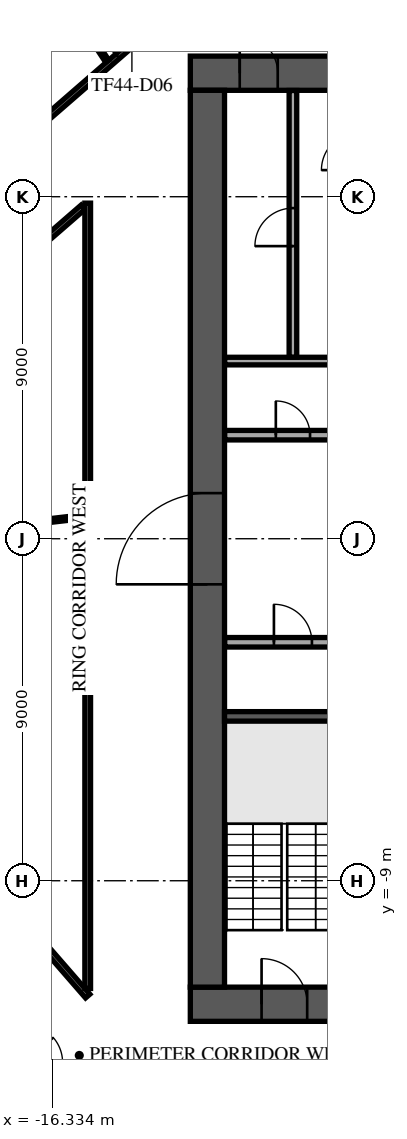
"""IFC4 building model, lengths in metres.
Left out: names, types, materials, properties, quantities, classifications, styles, units other than length and angle.
Written with IfcOpenShell. Run it as: python <this file> out.ifc"""

import sys

from ifc_helpers import new_model, si_unit, direction, frame, frame_2d, origin, place, context, subcontext, project, spatial, rectangle, extrude, element, fill, save


model = new_model("IFC4")
c1 = context("Model", 3, precision=1e-05, world=origin(), true_north=direction((0.0, 1.0)))
c2 = subcontext(c1, "Body", "Model", "MODEL_VIEW")
j1 = project(units=[si_unit("LENGTHUNIT", "METRE"), si_unit("PLANEANGLEUNIT", "RADIAN")], contexts=[c1])
p1 = place(None, origin())
s1 = spatial("IfcSite", under=j1, at=p1, CompositionType="ELEMENT")
p2 = place(p1, origin())
s2 = spatial("IfcBuilding", under=s1, at=p2, CompositionType="ELEMENT")
p3 = place(p2, frame((0.0, 0.0, 193.3)))
s3 = spatial("IfcBuildingStorey", under=s2, at=p3, CompositionType="ELEMENT", Elevation=193.3)
p4 = place(p3, frame((-12.7, 12.25, 0.0), z_axis=(0.0, 0.0, 1.0), x_axis=(1.0, 0.0, 0.0)))
e1 = element("IfcWall", 1, at=p4, inside=s3, PredefinedType="SHEAR", context=c2, shape_type="SweptSolid", body=[
    extrude(rectangle(XDim=25.4, YDim=0.9, at=frame_2d((12.7, 0.0))), origin(), (0.0, 0.0, 1.0), 3.62),
])
p5 = place(p4, frame((11.5, 0.0, 0.0)))
e2 = element("IfcOpeningElement", 2, at=p5, cuts=e1, PredefinedType="OPENING", context=c2, shape_type="SweptSolid", body=[
    extrude(rectangle(XDim=2.4, YDim=2.4, at=frame_2d((1.2, 1.2))), frame((0.0, 0.46, 0.0), z_axis=(0.0, -1.0, 0.0), x_axis=(1.0, 0.0, 0.0)), (0.0, 0.0, 1.0), 0.92),
])
p6 = place(p4, frame((22.325, 0.0, 0.0)))
e3 = element("IfcOpeningElement", 3, at=p6, cuts=e1, PredefinedType="OPENING", context=c2, shape_type="SweptSolid", body=[
    extrude(rectangle(XDim=1.2, YDim=2.1, at=frame_2d((0.6, 1.05))), frame((0.0, 0.46, 0.0), z_axis=(0.0, -1.0, 0.0), x_axis=(1.0, 0.0, 0.0)), (0.0, 0.0, 1.0), 0.92),
])
p7 = place(p4, frame((1.3, 0.0, 0.0)))
e4 = element("IfcOpeningElement", 4, at=p7, cuts=e1, PredefinedType="OPENING", context=c2, shape_type="SweptSolid", body=[
    extrude(rectangle(XDim=1.0, YDim=2.1, at=frame_2d((0.5, 1.05))), frame((0.0, 0.46, 0.0), z_axis=(0.0, -1.0, 0.0), x_axis=(1.0, 0.0, 0.0)), (0.0, 0.0, 1.0), 0.92),
])
p8 = place(p3, frame((-12.7, -12.25, 0.0), z_axis=(0.0, 0.0, 1.0), x_axis=(1.0, 0.0, 0.0)))
e5 = element("IfcWall", 5, at=p8, inside=s3, PredefinedType="SHEAR", context=c2, shape_type="SweptSolid", body=[
    extrude(rectangle(XDim=25.4, YDim=0.9, at=frame_2d((12.7, 0.0))), origin(), (0.0, 0.0, 1.0), 3.62),
])
p9 = place(p8, frame((7.6, 0.0, 0.0)))
e6 = element("IfcOpeningElement", 6, at=p9, cuts=e5, PredefinedType="OPENING", context=c2, shape_type="SweptSolid", body=[
    extrude(rectangle(XDim=2.0, YDim=2.1, at=frame_2d((1.0, 1.05))), frame((0.0, 0.46, 0.0), z_axis=(0.0, -1.0, 0.0), x_axis=(1.0, 0.0, 0.0)), (0.0, 0.0, 1.0), 0.92),
])
p10 = place(p8, frame((17.725, 0.0, 0.0)))
e7 = element("IfcOpeningElement", 7, at=p10, cuts=e5, PredefinedType="OPENING", context=c2, shape_type="SweptSolid", body=[
    extrude(rectangle(XDim=1.2, YDim=2.1, at=frame_2d((0.6, 1.05))), frame((0.0, 0.46, 0.0), z_axis=(0.0, -1.0, 0.0), x_axis=(1.0, 0.0, 0.0)), (0.0, 0.0, 1.0), 0.92),
])
p11 = place(p8, frame((1.875, 0.0, 0.0)))
e8 = element("IfcOpeningElement", 8, at=p11, cuts=e5, PredefinedType="OPENING", context=c2, shape_type="SweptSolid", body=[
    extrude(rectangle(XDim=1.2, YDim=2.1, at=frame_2d((0.6, 1.05))), frame((0.0, 0.46, 0.0), z_axis=(0.0, -1.0, 0.0), x_axis=(1.0, 0.0, 0.0)), (0.0, 0.0, 1.0), 0.92),
])
p12 = place(p8, frame((22.325, 0.0, 0.0)))
e9 = element("IfcOpeningElement", 9, at=p12, cuts=e5, PredefinedType="OPENING", context=c2, shape_type="SweptSolid", body=[
    extrude(rectangle(XDim=1.2, YDim=2.1, at=frame_2d((0.6, 1.05))), frame((0.0, 0.46, 0.0), z_axis=(0.0, -1.0, 0.0), x_axis=(1.0, 0.0, 0.0)), (0.0, 0.0, 1.0), 0.92),
])
p13 = place(p3, frame((-12.25, -11.8, 0.0), z_axis=(0.0, 0.0, 1.0), x_axis=(0.0, 1.0, 0.0)))
e10 = element("IfcWall", 10, at=p13, inside=s3, PredefinedType="SHEAR", context=c2, shape_type="SweptSolid", body=[
    extrude(rectangle(XDim=23.6, YDim=0.9, at=frame_2d((11.8, 0.0))), origin(), (0.0, 0.0, 1.0), 3.62),
])
p14 = place(p13, frame((10.6, 0.0, 0.0)))
e11 = element("IfcOpeningElement", 11, at=p14, cuts=e10, PredefinedType="OPENING", context=c2, shape_type="SweptSolid", body=[
    extrude(rectangle(XDim=2.4, YDim=2.4, at=frame_2d((1.2, 1.2))), frame((0.0, 0.46, 0.0), z_axis=(0.0, -1.0, 0.0), x_axis=(1.0, 0.0, 0.0)), (0.0, 0.0, 1.0), 0.92),
])
p15 = place(p3, frame((-8.65, -4.675, 0.0), z_axis=(0.0, 0.0, 1.0), x_axis=(-1.0, 0.0, 0.0)))
e12 = element("IfcWall", 12, at=p15, inside=s3, PredefinedType="SOLIDWALL", context=c2, shape_type="SweptSolid", body=[
    extrude(rectangle(XDim=3.15, YDim=0.25, at=frame_2d((1.575, 0.0))), origin(), (0.0, 0.0, 1.0), 3.62),
])
p16 = place(p3, frame((-11.795, -2.725, 0.0), z_axis=(0.0, 0.0, 1.0), x_axis=(1.0, 0.0, 0.0)))
e13 = element("IfcWall", 13, at=p16, inside=s3, PredefinedType="PARTITIONING", context=c2, shape_type="SweptSolid", body=[
    extrude(rectangle(XDim=8.915, YDim=0.25, at=frame_2d((4.458, 0.0))), origin(), (0.0, 0.0, 1.0), 3.62),
])
p17 = place(p16, frame((1.295, 0.0, 0.0)))
e14 = element("IfcOpeningElement", 14, at=p17, cuts=e13, PredefinedType="OPENING", context=c2, shape_type="SweptSolid", body=[
    extrude(rectangle(XDim=1.0, YDim=2.1, at=frame_2d((0.5, 1.05))), frame((0.0, 0.135, 0.0), z_axis=(0.0, -1.0, 0.0), x_axis=(1.0, 0.0, 0.0)), (0.0, 0.0, 1.0), 0.27),
])
p18 = place(p16, frame((4.42, 0.0, 0.0)))
e15 = element("IfcOpeningElement", 15, at=p18, cuts=e13, PredefinedType="OPENING", context=c2, shape_type="SweptSolid", body=[
    extrude(rectangle(XDim=1.0, YDim=2.1, at=frame_2d((0.5, 1.05))), frame((0.0, 0.135, 0.0), z_axis=(0.0, -1.0, 0.0), x_axis=(1.0, 0.0, 0.0)), (0.0, 0.0, 1.0), 0.27),
])
p19 = place(p3, frame((-11.795, 2.725, 0.0), z_axis=(0.0, 0.0, 1.0), x_axis=(1.0, 0.0, 0.0)))
e16 = element("IfcWall", 16, at=p19, inside=s3, PredefinedType="PARTITIONING", context=c2, shape_type="SweptSolid", body=[
    extrude(rectangle(XDim=3.415, YDim=0.25, at=frame_2d((1.708, 0.0))), origin(), (0.0, 0.0, 1.0), 3.62),
])
p20 = place(p19, frame((1.345, 0.0, 0.0)))
e17 = element("IfcOpeningElement", 17, at=p20, cuts=e16, PredefinedType="OPENING", context=c2, shape_type="SweptSolid", body=[
    extrude(rectangle(XDim=0.9, YDim=2.1, at=frame_2d((0.45, 1.05))), frame((0.0, 0.135, 0.0), z_axis=(0.0, -1.0, 0.0), x_axis=(1.0, 0.0, 0.0)), (0.0, 0.0, 1.0), 0.27),
])
p21 = place(p3, frame((-11.795, 4.675, 0.0), z_axis=(0.0, 0.0, 1.0), x_axis=(1.0, 0.0, 0.0)))
e18 = element("IfcWall", 18, at=p21, inside=s3, PredefinedType="PARTITIONING", context=c2, shape_type="SweptSolid", body=[
    extrude(rectangle(XDim=3.415, YDim=0.2, at=frame_2d((1.708, 0.0))), origin(), (0.0, 0.0, 1.0), 3.62),
])
p22 = place(p3, frame((-10.0, 4.78, 0.0), z_axis=(0.0, 0.0, 1.0), x_axis=(0.0, 1.0, 0.0)))
e19 = element("IfcWall", 19, at=p22, inside=s3, PredefinedType="PARTITIONING", context=c2, shape_type="SweptSolid", body=[
    extrude(rectangle(XDim=7.015, YDim=0.2, at=frame_2d((3.507, 0.0))), origin(), (0.0, 0.0, 1.0), 3.62),
])
p23 = place(p22, frame((2.92, 0.0, 0.0)))
e20 = element("IfcOpeningElement", 20, at=p23, cuts=e19, PredefinedType="OPENING", context=c2, shape_type="SweptSolid", body=[
    extrude(rectangle(XDim=1.0, YDim=2.1, at=frame_2d((0.5, 1.05))), frame((0.0, 0.11, 0.0), z_axis=(0.0, -1.0, 0.0), x_axis=(1.0, 0.0, 0.0)), (0.0, 0.0, 1.0), 0.22),
])
p24 = place(p3, frame((2.286, 34.715, 0.0), z_axis=(0.0, 0.0, 1.0), x_axis=(-0.754708272811, -0.656060532993, 0.0)))
e21 = element("IfcWall", 21, at=p24, inside=s3, PredefinedType="STANDARD", context=c2, shape_type="SweptSolid", body=[
    extrude(rectangle(XDim=49.0, YDim=0.6, at=frame_2d((24.5, 0.0))), origin(), (0.0, 0.0, 1.0), 3.62),
])
p25 = place(p24, frame((1.227, 0.0, 0.9)))
e22 = element("IfcOpeningElement", 22, at=p25, cuts=e21, PredefinedType="OPENING", context=c2, shape_type="SweptSolid", body=[
    extrude(rectangle(XDim=2.0, YDim=2.1, at=frame_2d((1.0, 1.05))), frame((0.0, 0.31, 0.0), z_axis=(0.0, -1.0, 0.0), x_axis=(1.0, 0.0, 0.0)), (0.0, 0.0, 1.0), 0.62),
])
p26 = place(p24, frame((5.682, 0.0, 0.9)))
e23 = element("IfcOpeningElement", 23, at=p26, cuts=e21, PredefinedType="OPENING", context=c2, shape_type="SweptSolid", body=[
    extrude(rectangle(XDim=2.0, YDim=2.1, at=frame_2d((1.0, 1.05))), frame((0.0, 0.31, 0.0), z_axis=(0.0, -1.0, 0.0), x_axis=(1.0, 0.0, 0.0)), (0.0, 0.0, 1.0), 0.62),
])
p27 = place(p24, frame((10.136, 0.0, 0.9)))
e24 = element("IfcOpeningElement", 24, at=p27, cuts=e21, PredefinedType="OPENING", context=c2, shape_type="SweptSolid", body=[
    extrude(rectangle(XDim=2.0, YDim=2.1, at=frame_2d((1.0, 1.05))), frame((0.0, 0.31, 0.0), z_axis=(0.0, -1.0, 0.0), x_axis=(1.0, 0.0, 0.0)), (0.0, 0.0, 1.0), 0.62),
])
p28 = place(p24, frame((14.591, 0.0, 0.9)))
e25 = element("IfcOpeningElement", 25, at=p28, cuts=e21, PredefinedType="OPENING", context=c2, shape_type="SweptSolid", body=[
    extrude(rectangle(XDim=2.0, YDim=2.1, at=frame_2d((1.0, 1.05))), frame((0.0, 0.31, 0.0), z_axis=(0.0, -1.0, 0.0), x_axis=(1.0, 0.0, 0.0)), (0.0, 0.0, 1.0), 0.62),
])
p29 = place(p24, frame((19.045, 0.0, 0.9)))
e26 = element("IfcOpeningElement", 26, at=p29, cuts=e21, PredefinedType="OPENING", context=c2, shape_type="SweptSolid", body=[
    extrude(rectangle(XDim=2.0, YDim=2.1, at=frame_2d((1.0, 1.05))), frame((0.0, 0.31, 0.0), z_axis=(0.0, -1.0, 0.0), x_axis=(1.0, 0.0, 0.0)), (0.0, 0.0, 1.0), 0.62),
])
p30 = place(p24, frame((23.5, 0.0, 0.9)))
e27 = element("IfcOpeningElement", 27, at=p30, cuts=e21, PredefinedType="OPENING", context=c2, shape_type="SweptSolid", body=[
    extrude(rectangle(XDim=2.0, YDim=2.1, at=frame_2d((1.0, 1.05))), frame((0.0, 0.31, 0.0), z_axis=(0.0, -1.0, 0.0), x_axis=(1.0, 0.0, 0.0)), (0.0, 0.0, 1.0), 0.62),
])
p31 = place(p24, frame((27.955, 0.0, 0.9)))
e28 = element("IfcOpeningElement", 28, at=p31, cuts=e21, PredefinedType="OPENING", context=c2, shape_type="SweptSolid", body=[
    extrude(rectangle(XDim=2.0, YDim=2.1, at=frame_2d((1.0, 1.05))), frame((0.0, 0.31, 0.0), z_axis=(0.0, -1.0, 0.0), x_axis=(1.0, 0.0, 0.0)), (0.0, 0.0, 1.0), 0.62),
])
p32 = place(p24, frame((32.409, 0.0, 0.9)))
e29 = element("IfcOpeningElement", 29, at=p32, cuts=e21, PredefinedType="OPENING", context=c2, shape_type="SweptSolid", body=[
    extrude(rectangle(XDim=2.0, YDim=2.1, at=frame_2d((1.0, 1.05))), frame((0.0, 0.31, 0.0), z_axis=(0.0, -1.0, 0.0), x_axis=(1.0, 0.0, 0.0)), (0.0, 0.0, 1.0), 0.62),
])
p33 = place(p24, frame((36.864, 0.0, 0.9)))
e30 = element("IfcOpeningElement", 30, at=p33, cuts=e21, PredefinedType="OPENING", context=c2, shape_type="SweptSolid", body=[
    extrude(rectangle(XDim=2.0, YDim=2.1, at=frame_2d((1.0, 1.05))), frame((0.0, 0.31, 0.0), z_axis=(0.0, -1.0, 0.0), x_axis=(1.0, 0.0, 0.0)), (0.0, 0.0, 1.0), 0.62),
])
p34 = place(p24, frame((41.318, 0.0, 0.9)))
e31 = element("IfcOpeningElement", 31, at=p34, cuts=e21, PredefinedType="OPENING", context=c2, shape_type="SweptSolid", body=[
    extrude(rectangle(XDim=2.0, YDim=2.1, at=frame_2d((1.0, 1.05))), frame((0.0, 0.31, 0.0), z_axis=(0.0, -1.0, 0.0), x_axis=(1.0, 0.0, 0.0)), (0.0, 0.0, 1.0), 0.62),
])
p35 = place(p24, frame((45.773, 0.0, 0.9)))
e32 = element("IfcOpeningElement", 32, at=p35, cuts=e21, PredefinedType="OPENING", context=c2, shape_type="SweptSolid", body=[
    extrude(rectangle(XDim=2.0, YDim=2.1, at=frame_2d((1.0, 1.05))), frame((0.0, 0.31, 0.0), z_axis=(0.0, -1.0, 0.0), x_axis=(1.0, 0.0, 0.0)), (0.0, 0.0, 1.0), 0.62),
])
p36 = place(p3, frame((-35.208, -4.768, 0.0), z_axis=(0.0, 0.0, 1.0), x_axis=(0.656058749455, -0.754709823219, 0.0)))
e33 = element("IfcWall", 33, at=p36, inside=s3, PredefinedType="STANDARD", context=c2, shape_type="SweptSolid", body=[
    extrude(rectangle(XDim=39.0, YDim=0.6, at=frame_2d((19.5, 0.0))), origin(), (0.0, 0.0, 1.0), 3.62),
])
p37 = place(p36, frame((1.217, 0.0, 0.9)))
e34 = element("IfcOpeningElement", 34, at=p37, cuts=e33, PredefinedType="OPENING", context=c2, shape_type="SweptSolid", body=[
    extrude(rectangle(XDim=1.9, YDim=2.1, at=frame_2d((0.95, 1.05))), frame((0.0, 0.31, 0.0), z_axis=(0.0, -1.0, 0.0), x_axis=(1.0, 0.0, 0.0)), (0.0, 0.0, 1.0), 0.62),
])
p38 = place(p36, frame((5.55, 0.0, 0.9)))
e35 = element("IfcOpeningElement", 35, at=p38, cuts=e33, PredefinedType="OPENING", context=c2, shape_type="SweptSolid", body=[
    extrude(rectangle(XDim=1.9, YDim=2.1, at=frame_2d((0.95, 1.05))), frame((0.0, 0.31, 0.0), z_axis=(0.0, -1.0, 0.0), x_axis=(1.0, 0.0, 0.0)), (0.0, 0.0, 1.0), 0.62),
])
p39 = place(p36, frame((9.883, 0.0, 0.9)))
e36 = element("IfcOpeningElement", 36, at=p39, cuts=e33, PredefinedType="OPENING", context=c2, shape_type="SweptSolid", body=[
    extrude(rectangle(XDim=1.9, YDim=2.1, at=frame_2d((0.95, 1.05))), frame((0.0, 0.31, 0.0), z_axis=(0.0, -1.0, 0.0), x_axis=(1.0, 0.0, 0.0)), (0.0, 0.0, 1.0), 0.62),
])
p40 = place(p36, frame((14.217, 0.0, 0.9)))
e37 = element("IfcOpeningElement", 37, at=p40, cuts=e33, PredefinedType="OPENING", context=c2, shape_type="SweptSolid", body=[
    extrude(rectangle(XDim=1.9, YDim=2.1, at=frame_2d((0.95, 1.05))), frame((0.0, 0.31, 0.0), z_axis=(0.0, -1.0, 0.0), x_axis=(1.0, 0.0, 0.0)), (0.0, 0.0, 1.0), 0.62),
])
p41 = place(p36, frame((18.55, 0.0, 0.9)))
e38 = element("IfcOpeningElement", 38, at=p41, cuts=e33, PredefinedType="OPENING", context=c2, shape_type="SweptSolid", body=[
    extrude(rectangle(XDim=1.9, YDim=2.1, at=frame_2d((0.95, 1.05))), frame((0.0, 0.31, 0.0), z_axis=(0.0, -1.0, 0.0), x_axis=(1.0, 0.0, 0.0)), (0.0, 0.0, 1.0), 0.62),
])
p42 = place(p36, frame((22.883, 0.0, 0.9)))
e39 = element("IfcOpeningElement", 39, at=p42, cuts=e33, PredefinedType="OPENING", context=c2, shape_type="SweptSolid", body=[
    extrude(rectangle(XDim=1.9, YDim=2.1, at=frame_2d((0.95, 1.05))), frame((0.0, 0.31, 0.0), z_axis=(0.0, -1.0, 0.0), x_axis=(1.0, 0.0, 0.0)), (0.0, 0.0, 1.0), 0.62),
])
p43 = place(p36, frame((27.217, 0.0, 0.9)))
e40 = element("IfcOpeningElement", 40, at=p43, cuts=e33, PredefinedType="OPENING", context=c2, shape_type="SweptSolid", body=[
    extrude(rectangle(XDim=1.9, YDim=2.1, at=frame_2d((0.95, 1.05))), frame((0.0, 0.31, 0.0), z_axis=(0.0, -1.0, 0.0), x_axis=(1.0, 0.0, 0.0)), (0.0, 0.0, 1.0), 0.62),
])
p44 = place(p36, frame((31.55, 0.0, 0.9)))
e41 = element("IfcOpeningElement", 41, at=p44, cuts=e33, PredefinedType="OPENING", context=c2, shape_type="SweptSolid", body=[
    extrude(rectangle(XDim=1.9, YDim=2.1, at=frame_2d((0.95, 1.05))), frame((0.0, 0.31, 0.0), z_axis=(0.0, -1.0, 0.0), x_axis=(1.0, 0.0, 0.0)), (0.0, 0.0, 1.0), 0.62),
])
p45 = place(p36, frame((35.883, 0.0, 0.9)))
e42 = element("IfcOpeningElement", 42, at=p45, cuts=e33, PredefinedType="OPENING", context=c2, shape_type="SweptSolid", body=[
    extrude(rectangle(XDim=1.9, YDim=2.1, at=frame_2d((0.95, 1.05))), frame((0.0, 0.31, 0.0), z_axis=(0.0, -1.0, 0.0), x_axis=(1.0, 0.0, 0.0)), (0.0, 0.0, 1.0), 0.62),
])
p46 = place(p3, frame((-26.208, 2.616, 0.0), z_axis=(0.0, 0.0, 1.0), x_axis=(0.754710701231, 0.656057739416, 0.0)))
e43 = element("IfcWall", 43, at=p46, inside=s3, PredefinedType="PARTITIONING", context=c2, shape_type="SweptSolid", body=[
    extrude(rectangle(XDim=36.126, YDim=0.15, at=frame_2d((18.063, 0.0))), origin(), (0.0, 0.0, 1.0), 3.17),
])
p47 = place(p46, frame((2.551, 0.0, 0.0)))
e44 = element("IfcOpeningElement", 44, at=p47, cuts=e43, PredefinedType="OPENING", context=c2, shape_type="SweptSolid", body=[
    extrude(rectangle(XDim=1.0, YDim=2.1, at=frame_2d((0.5, 1.05))), frame((0.0, 0.085, 0.0), z_axis=(0.0, -1.0, 0.0), x_axis=(1.0, 0.0, 0.0)), (0.0, 0.0, 1.0), 0.17),
])
p48 = place(p46, frame((15.362, 0.0, 0.0)))
e45 = element("IfcOpeningElement", 45, at=p48, cuts=e43, PredefinedType="OPENING", context=c2, shape_type="SweptSolid", body=[
    extrude(rectangle(XDim=1.0, YDim=2.1, at=frame_2d((0.5, 1.05))), frame((0.0, 0.085, 0.0), z_axis=(0.0, -1.0, 0.0), x_axis=(1.0, 0.0, 0.0)), (0.0, 0.0, 1.0), 0.17),
])
p49 = place(p46, frame((25.542, 0.0, 0.0)))
e46 = element("IfcOpeningElement", 46, at=p49, cuts=e43, PredefinedType="OPENING", context=c2, shape_type="SweptSolid", body=[
    extrude(rectangle(XDim=1.8, YDim=2.1, at=frame_2d((0.9, 1.05))), frame((0.0, 0.085, 0.0), z_axis=(0.0, -1.0, 0.0), x_axis=(1.0, 0.0, 0.0)), (0.0, 0.0, 1.0), 0.17),
])
p50 = place(p3, frame((-24.98, -4.673, 0.0), z_axis=(0.0, 0.0, 1.0), x_axis=(0.656048444225, -0.754718781289, 0.0)))
e47 = element("IfcWall", 47, at=p50, inside=s3, PredefinedType="PARTITIONING", context=c2, shape_type="SweptSolid", body=[
    extrude(rectangle(XDim=25.8, YDim=0.15, at=frame_2d((12.9, 0.0))), origin(), (0.0, 0.0, 1.0), 3.17),
])
p51 = place(p50, frame((12.071, 0.0, 0.0)))
e48 = element("IfcOpeningElement", 48, at=p51, cuts=e47, PredefinedType="OPENING", context=c2, shape_type="SweptSolid", body=[
    extrude(rectangle(XDim=1.0, YDim=2.1, at=frame_2d((0.5, 1.05))), frame((0.0, 0.085, 0.0), z_axis=(0.0, -1.0, 0.0), x_axis=(1.0, 0.0, 0.0)), (0.0, 0.0, 1.0), 0.17),
])
p52 = place(p50, frame((24.318, 0.0, 0.0)))
e49 = element("IfcOpeningElement", 49, at=p52, cuts=e47, PredefinedType="OPENING", context=c2, shape_type="SweptSolid", body=[
    extrude(rectangle(XDim=1.0, YDim=2.1, at=frame_2d((0.5, 1.05))), frame((0.0, 0.085, 0.0), z_axis=(0.0, -1.0, 0.0), x_axis=(1.0, 0.0, 0.0)), (0.0, 0.0, 1.0), 0.17),
])
p53 = place(p3, frame((-24.576, 0.854, 0.0), z_axis=(0.0, 0.0, 1.0), x_axis=(0.75472382762, 0.656042638875, 0.0)))
e50 = element("IfcWall", 50, at=p53, inside=s3, PredefinedType="PARTITIONING", context=c2, shape_type="SweptSolid", body=[
    extrude(rectangle(XDim=11.994, YDim=0.15, at=frame_2d((5.997, 0.0))), origin(), (0.0, 0.0, 1.0), 3.17),
])
p54 = place(p53, frame((6.8, 0.0, 0.0)))
e51 = element("IfcOpeningElement", 51, at=p54, cuts=e50, PredefinedType="OPENING", context=c2, shape_type="SweptSolid", body=[
    extrude(rectangle(XDim=1.8, YDim=2.1, at=frame_2d((0.9, 1.05))), frame((0.0, 0.085, 0.0), z_axis=(0.0, -1.0, 0.0), x_axis=(1.0, 0.0, 0.0)), (0.0, 0.0, 1.0), 0.17),
])
p55 = place(p3, frame((-23.169, -3.098, 0.0), z_axis=(0.0, 0.0, 1.0), x_axis=(0.656047525283, -0.754719580089, 0.0)))
e52 = element("IfcWall", 52, at=p55, inside=s3, PredefinedType="PARTITIONING", context=c2, shape_type="SweptSolid", body=[
    extrude(rectangle(XDim=11.842, YDim=0.15, at=frame_2d((5.921, 0.0))), origin(), (0.0, 0.0, 1.0), 3.17),
])
p56 = place(p55, frame((2.8, 0.0, 0.0)))
e53 = element("IfcOpeningElement", 53, at=p56, cuts=e52, PredefinedType="OPENING", context=c2, shape_type="SweptSolid", body=[
    extrude(rectangle(XDim=1.8, YDim=2.1, at=frame_2d((0.9, 1.05))), frame((0.0, 0.085, 0.0), z_axis=(0.0, -1.0, 0.0), x_axis=(1.0, 0.0, 0.0)), (0.0, 0.0, 1.0), 0.17),
])
p57 = place(p55, frame((7.55, 0.0, 0.0)))
e54 = element("IfcOpeningElement", 54, at=p57, cuts=e52, PredefinedType="OPENING", context=c2, shape_type="SweptSolid", body=[
    extrude(rectangle(XDim=1.0, YDim=2.1, at=frame_2d((0.5, 1.05))), frame((0.0, 0.085, 0.0), z_axis=(0.0, -1.0, 0.0), x_axis=(1.0, 0.0, 0.0)), (0.0, 0.0, 1.0), 0.17),
])
p58 = place(p3, frame((-15.4, -11.834, 0.0), z_axis=(0.0, 0.0, 1.0), x_axis=(0.0, 1.0, 0.0)))
e55 = element("IfcWall", 55, at=p58, inside=s3, PredefinedType="PARTITIONING", context=c2, shape_type="SweptSolid", body=[
    extrude(rectangle(XDim=20.666, YDim=0.15, at=frame_2d((10.333, 0.0))), origin(), (0.0, 0.0, 1.0), 3.17),
])
p59 = place(p3, frame((-31.316, -1.242, 0.0), z_axis=(0.0, 0.0, 1.0), x_axis=(0.993421473136, 0.114515399452, 0.0)))
e56 = element("IfcWall", 56, at=p59, inside=s3, PredefinedType="PARTITIONING", context=c2, shape_type="SweptSolid", body=[
    extrude(rectangle(XDim=15.941, YDim=0.1, at=frame_2d((7.97, 0.0))), origin(), (0.0, 0.0, 1.0), 3.17),
])
p60 = place(p3, frame((-16.328, 14.751, 0.0), z_axis=(0.0, 0.0, 1.0), x_axis=(0.550713616712, -0.83469426281, 0.0)))
e57 = element("IfcWall", 57, at=p60, inside=s3, PredefinedType="PARTITIONING", context=c2, shape_type="SweptSolid", body=[
    extrude(rectangle(XDim=2.619, YDim=0.1, at=frame_2d((1.309, 0.0))), origin(), (0.0, 0.0, 1.0), 3.17),
])
p61 = place(p7, origin())
e58 = element("IfcDoor", 58, at=p61, inside=s3, OperationType="SINGLE_SWING_LEFT", PredefinedType="DOOR", context=c2, shape_type="SweptSolid", body=[
    extrude(rectangle(XDim=1.0, YDim=2.1, at=frame_2d((0.5, 1.05))), frame((0.0, 0.025, 0.0), z_axis=(0.0, -1.0, 0.0), x_axis=(1.0, 0.0, 0.0)), (0.0, 0.0, 1.0), 0.05),
])
fill(e4, e58)
p62 = place(p11, origin())
e59 = element("IfcDoor", 59, at=p62, inside=s3, OperationType="SINGLE_SWING_LEFT", PredefinedType="DOOR", context=c2, shape_type="SweptSolid", body=[
    extrude(rectangle(XDim=1.2, YDim=2.1, at=frame_2d((0.6, 1.05))), frame((0.0, 0.025, 0.0), z_axis=(0.0, -1.0, 0.0), x_axis=(1.0, 0.0, 0.0)), (0.0, 0.0, 1.0), 0.05),
])
fill(e8, e59)
p63 = place(p14, origin())
e60 = element("IfcDoor", 60, at=p63, inside=s3, OperationType="SINGLE_SWING_LEFT", PredefinedType="DOOR", context=c2, shape_type="SweptSolid", body=[
    extrude(rectangle(XDim=2.4, YDim=2.4, at=frame_2d((1.2, 1.2))), frame((0.0, 0.025, 0.0), z_axis=(0.0, -1.0, 0.0), x_axis=(1.0, 0.0, 0.0)), (0.0, 0.0, 1.0), 0.05),
])
fill(e11, e60)
p64 = place(p17, origin())
e61 = element("IfcDoor", 61, at=p64, inside=s3, OperationType="SINGLE_SWING_RIGHT", PredefinedType="DOOR", context=c2, shape_type="SweptSolid", body=[
    extrude(rectangle(XDim=1.0, YDim=2.1, at=frame_2d((0.5, 1.05))), frame((0.0, 0.025, 0.0), z_axis=(0.0, -1.0, 0.0), x_axis=(1.0, 0.0, 0.0)), (0.0, 0.0, 1.0), 0.05),
])
fill(e14, e61)
p65 = place(p20, origin())
e62 = element("IfcDoor", 62, at=p65, inside=s3, OperationType="SINGLE_SWING_RIGHT", PredefinedType="DOOR", context=c2, shape_type="SweptSolid", body=[
    extrude(rectangle(XDim=0.9, YDim=2.1, at=frame_2d((0.45, 1.05))), frame((0.0, 0.025, 0.0), z_axis=(0.0, -1.0, 0.0), x_axis=(1.0, 0.0, 0.0)), (0.0, 0.0, 1.0), 0.05),
])
fill(e17, e62)
p66 = place(p23, origin())
e63 = element("IfcDoor", 63, at=p66, inside=s3, OperationType="SINGLE_SWING_RIGHT", PredefinedType="DOOR", context=c2, shape_type="SweptSolid", body=[
    extrude(rectangle(XDim=1.0, YDim=2.1, at=frame_2d((0.5, 1.05))), frame((0.0, 0.025, 0.0), z_axis=(0.0, -1.0, 0.0), x_axis=(1.0, 0.0, 0.0)), (0.0, 0.0, 1.0), 0.05),
])
fill(e20, e63)
p67 = place(p48, origin())
e64 = element("IfcDoor", 64, at=p67, inside=s3, OperationType="SINGLE_SWING_RIGHT", PredefinedType="DOOR", context=c2, shape_type="SweptSolid", body=[
    extrude(rectangle(XDim=1.0, YDim=2.1, at=frame_2d((0.5, 1.05))), frame((0.0, 0.025, 0.0), z_axis=(0.0, -1.0, 0.0), x_axis=(1.0, 0.0, 0.0)), (0.0, 0.0, 1.0), 0.05),
])
fill(e45, e64)
save(model, sys.argv[1])
